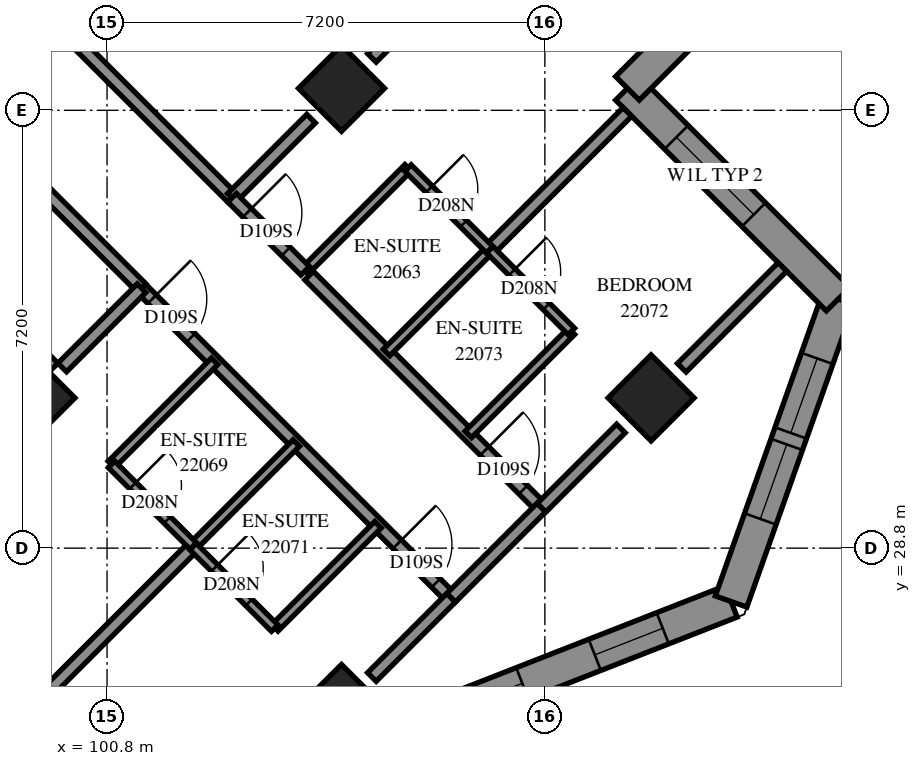
"""IFC4 building model, lengths in metres.
Left out: names, types, materials, properties, quantities, classifications, styles, units other than length and angle.
Written with IfcOpenShell. Run it as: python <this file> out.ifc"""

import sys

from ifc_helpers import new_model, si_unit, direction, frame, frame_2d, origin, origin_2d, place, context, subcontext, project, spatial, polyline, rectangle, outline, extrude, element, fill, save


model = new_model("IFC4")
c1 = context("Model", 3, precision=1e-05, world=origin(), true_north=direction((0.0, 1.0)))
c2 = subcontext(c1, "Body", "Model", "MODEL_VIEW")
j1 = project(units=[si_unit("LENGTHUNIT", "METRE"), si_unit("PLANEANGLEUNIT", "RADIAN")], contexts=[c1])
p1 = place(None, origin())
s1 = spatial("IfcSite", under=j1, at=p1, CompositionType="ELEMENT")
p2 = place(p1, origin())
s2 = spatial("IfcBuilding", under=s1, at=p2, CompositionType="ELEMENT")
p3 = place(p2, frame((0.0, 0.0, 84.6)))
s3 = spatial("IfcBuildingStorey", under=s2, at=p3, CompositionType="ELEMENT", Elevation=84.6)
for number, where, z_axis, x_axis in (
    (1, (104.656, 36.362, 0.0), (0.0, 0.0, 1.0), (0.707, -0.707, 0.0)),
    (2, (99.565, 31.271, 0.0), (0.0, 0.0, 1.0), (0.707, -0.707, 0.0)),
    (3, (109.747, 31.271, 0.0), (0.0, 0.0, 1.0), (0.707, -0.707, 0.0)),
    (4, (104.656, 26.18, 0.0), (0.0, 0.0, 1.0), (0.707, -0.707, 0.0)),
):
    element("IfcColumn", number, at=place(p3, frame(where, z_axis=z_axis, x_axis=x_axis)), inside=s3, PredefinedType="COLUMN", context=c2, shape_type="SweptSolid", body=[
        extrude(rectangle(XDim=1.0, YDim=1.0, at=origin_2d()), origin(), (0.0, 0.0, 1.0), 3.1),
    ])
p4 = place(p3, frame((105.953, 25.922, 0.0), z_axis=(0.0, 0.0, 1.0), x_axis=(0.9311384103, 0.3646659578, 0.0)))
e5 = element("IfcWall", 5, at=p4, inside=s3, PredefinedType="SOLIDWALL", context=c2, shape_type="SweptSolid", body=[
    extrude(outline(polyline([(0.12, -0.275), (5.613, -0.275), (5.361, 0.275), (-0.12, 0.275), (0.12, -0.275)])), origin(), (0.0, 0.0, 1.0), 3.1),
])
p5 = place(p4, frame((0.599, 0.0, 0.5)))
e6 = element("IfcOpeningElement", 6, at=p5, cuts=e5, PredefinedType="OPENING", context=c2, shape_type="SweptSolid", body=[
    extrude(rectangle(XDim=1.2, YDim=2.45, at=frame_2d((0.6, 1.225))), frame((0.0, 0.285, 0.0), z_axis=(0.0, -1.0, 0.0), x_axis=(1.0, 0.0, 0.0)), (0.0, 0.0, 1.0), 0.57),
])
p6 = place(p4, frame((3.08, 0.0, 0.5)))
e7 = element("IfcOpeningElement", 7, at=p6, cuts=e5, PredefinedType="OPENING", context=c2, shape_type="SweptSolid", body=[
    extrude(rectangle(XDim=1.2, YDim=2.45, at=frame_2d((0.6, 1.225))), frame((0.0, 0.285, 0.0), z_axis=(0.0, -1.0, 0.0), x_axis=(1.0, 0.0, 0.0)), (0.0, 0.0, 1.0), 0.57),
])
p7 = place(p3, frame((111.062, 27.922, 0.0), z_axis=(0.0, 0.0, 1.0), x_axis=(0.3338559134, 0.9426241187, 0.0)))
e8 = element("IfcWall", 8, at=p7, inside=s3, PredefinedType="SOLIDWALL", context=c2, shape_type="SweptSolid", body=[
    extrude(outline(polyline([(-0.126, -0.275), (5.45, -0.275), (5.103, 0.275), (0.126, 0.275), (-0.126, -0.275)])), origin(), (0.0, 0.0, 1.0), 3.1),
])
p8 = place(p7, frame((1.441, 0.0, 0.5)))
e9 = element("IfcOpeningElement", 9, at=p8, cuts=e8, PredefinedType="OPENING", context=c2, shape_type="SweptSolid", body=[
    extrude(rectangle(XDim=1.3, YDim=2.45, at=frame_2d((0.65, 1.225))), frame((0.0, 0.285, 0.0), z_axis=(0.0, -1.0, 0.0), x_axis=(1.0, 0.0, 0.0)), (0.0, 0.0, 1.0), 0.57),
])
p9 = place(p7, frame((2.941, 0.0, 0.5)))
e10 = element("IfcOpeningElement", 10, at=p9, cuts=e8, PredefinedType="OPENING", context=c2, shape_type="SweptSolid", body=[
    extrude(rectangle(XDim=1.3, YDim=2.45, at=frame_2d((0.65, 1.225))), frame((0.0, 0.285, 0.0), z_axis=(0.0, -1.0, 0.0), x_axis=(1.0, 0.0, 0.0)), (0.0, 0.0, 1.0), 0.57),
])
p10 = place(p3, frame((112.824, 32.896, 0.0), z_axis=(0.0, 0.0, 1.0), x_axis=(-0.7070965801, 0.7071169822, 0.0)))
e11 = element("IfcWall", 11, at=p10, inside=s3, PredefinedType="SOLIDWALL", context=c2, shape_type="SweptSolid", body=[
    extrude(outline(polyline([(-0.173, -0.275), (4.627, -0.275), (5.176, 0.275), (0.173, 0.275), (-0.173, -0.275)])), origin(), (0.0, 0.0, 1.0), 3.1),
])
p11 = place(p10, frame((1.964, 0.0, 0.6)))
e12 = element("IfcOpeningElement", 12, at=p11, cuts=e11, PredefinedType="OPENING", context=c2, shape_type="SweptSolid", body=[
    extrude(rectangle(XDim=1.8, YDim=1.9, at=frame_2d((0.9, 0.95))), frame((0.0, 0.285, 0.0), z_axis=(0.0, -1.0, 0.0), x_axis=(1.0, 0.0, 0.0)), (0.0, 0.0, 1.0), 0.57),
])
p12 = place(p3, frame((109.358, 36.362, 0.0), z_axis=(0.0, 0.0, 1.0), x_axis=(0.7071067812, 0.7071067812, 0.0)))
e13 = element("IfcWall", 13, at=p12, inside=s3, PredefinedType="SOLIDWALL", context=c2, shape_type="SweptSolid", body=[
    extrude(outline(polyline([(0.275, -0.275), (6.005, -0.275), (5.285, 0.275), (-0.275, 0.275), (0.275, -0.275)])), origin(), (0.0, 0.0, 1.0), 3.1),
])
p13 = place(p12, frame((1.137, 0.0, 0.6)))
e14 = element("IfcOpeningElement", 14, at=p13, cuts=e13, PredefinedType="OPENING", context=c2, shape_type="SweptSolid", body=[
    extrude(rectangle(XDim=1.8, YDim=1.9, at=frame_2d((0.9, 0.95))), frame((0.0, 0.285, 0.0), z_axis=(0.0, -1.0, 0.0), x_axis=(1.0, 0.0, 0.0)), (0.0, 0.0, 1.0), 0.57),
])
p14 = place(p3, frame((96.513, 23.123, 0.0), z_axis=(0.0, 0.0, 1.0), x_axis=(0.7069766463, 0.7072368922, 0.0)))
e15 = element("IfcWall", 15, at=p14, inside=s3, PredefinedType="PARTITIONING", context=c2, shape_type="SweptSolid", body=[
    extrude(rectangle(XDim=8.069, YDim=0.2, at=frame_2d((4.035, 0.0))), origin(), (0.0, 0.0, 1.0), 3.1),
])
p15 = place(p3, frame((101.365, 33.071, 0.0), z_axis=(0.0, 0.0, 1.0), x_axis=(0.7071067812, -0.7071067812, 0.0)))
e16 = element("IfcWall", 16, at=p15, inside=s3, PredefinedType="PARTITIONING", context=c2, shape_type="SweptSolid", body=[
    extrude(rectangle(XDim=7.2, YDim=0.2, at=frame_2d((3.6, 0.0))), origin(), (0.0, 0.0, 1.0), 3.1),
])
p16 = place(p15, frame((0.248, 0.0, 0.0)))
e17 = element("IfcOpeningElement", 17, at=p16, cuts=e16, PredefinedType="OPENING", context=c2, shape_type="SweptSolid", body=[
    extrude(rectangle(XDim=0.9, YDim=2.1, at=frame_2d((0.45, 1.05))), frame((0.0, 0.11, 0.0), z_axis=(0.0, -1.0, 0.0), x_axis=(1.0, 0.0, 0.0)), (0.0, 0.0, 1.0), 0.22),
])
p17 = place(p15, frame((5.95, 0.0, 0.0)))
e18 = element("IfcOpeningElement", 18, at=p17, cuts=e16, PredefinedType="OPENING", context=c2, shape_type="SweptSolid", body=[
    extrude(rectangle(XDim=0.9, YDim=2.1, at=frame_2d((0.45, 1.05))), frame((0.0, 0.11, 0.0), z_axis=(0.0, -1.0, 0.0), x_axis=(1.0, 0.0, 0.0)), (0.0, 0.0, 1.0), 0.22),
])
p18 = place(p3, frame((105.155, 36.863, 0.0), z_axis=(0.0, 0.0, 1.0), x_axis=(0.7071067812, 0.7071067812, 0.0)))
e19 = element("IfcWall", 19, at=p18, inside=s3, PredefinedType="PARTITIONING", context=c2, shape_type="SweptSolid", body=[
    extrude(rectangle(XDim=5.787, YDim=0.2, at=frame_2d((2.893, 0.0))), origin(), (0.0, 0.0, 1.0), 3.1),
])
p19 = place(p3, frame((104.123, 33.282, 0.0), z_axis=(0.0, 0.0, 1.0), x_axis=(0.7071067812, -0.7071067812, 0.0)))
e20 = element("IfcWall", 20, at=p19, inside=s3, PredefinedType="PARTITIONING", context=c2, shape_type="SweptSolid", body=[
    extrude(rectangle(XDim=5.399, YDim=0.2, at=frame_2d((2.7, 0.0))), origin(), (0.0, 0.0, 1.0), 3.1),
])
p20 = place(p19, frame((4.08, 0.0, 0.0)))
e21 = element("IfcOpeningElement", 21, at=p20, cuts=e20, PredefinedType="OPENING", context=c2, shape_type="SweptSolid", body=[
    extrude(rectangle(XDim=0.9, YDim=2.1, at=frame_2d((0.45, 1.05))), frame((0.0, 0.11, 0.0), z_axis=(0.0, -1.0, 0.0), x_axis=(1.0, 0.0, 0.0)), (0.0, 0.0, 1.0), 0.22),
])
p21 = place(p3, frame((98.469, 35.973, 0.0), z_axis=(0.0, 0.0, 1.0), x_axis=(0.7073506531, -0.7068628251, 0.0)))
e22 = element("IfcWall", 22, at=p21, inside=s3, PredefinedType="PARTITIONING", context=c2, shape_type="SweptSolid", body=[
    extrude(rectangle(XDim=4.1, YDim=0.2, at=frame_2d((2.05, 0.0))), origin(), (0.0, 0.0, 1.0), 3.1),
])
p22 = place(p21, frame((0.457, 0.0, 0.0)))
e23 = element("IfcOpeningElement", 23, at=p22, cuts=e22, PredefinedType="OPENING", context=c2, shape_type="SweptSolid", body=[
    extrude(rectangle(XDim=1.0, YDim=2.1, at=frame_2d((0.5, 1.05))), frame((0.0, 0.11, 0.0), z_axis=(0.0, -1.0, 0.0), x_axis=(1.0, 0.0, 0.0)), (0.0, 0.0, 1.0), 0.22),
])
p23 = place(p3, frame((100.31, 37.106, 0.0), z_axis=(0.0, 0.0, 1.0), x_axis=(0.7073845681, -0.7068288851, 0.0)))
e24 = element("IfcWall", 24, at=p23, inside=s3, PredefinedType="PARTITIONING", context=c2, shape_type="SweptSolid", body=[
    extrude(rectangle(XDim=3.599, YDim=0.2, at=frame_2d((1.8, 0.0))), origin(), (0.0, 0.0, 1.0), 3.1),
])
p24 = place(p3, frame((107.095, 33.711, 0.0), z_axis=(0.0, 0.0, 1.0), x_axis=(0.7071067812, 0.7071067812, 0.0)))
e25 = element("IfcWall", 25, at=p24, inside=s3, PredefinedType="PARTITIONING", context=c2, shape_type="SweptSolid", body=[
    extrude(rectangle(XDim=3.2, YDim=0.2, at=frame_2d((1.6, 0.0))), origin(), (0.0, 0.0, 1.0), 3.1),
])
p25 = place(p3, frame((100.871, 30.175, 0.0), z_axis=(0.0, 0.0, 1.0), x_axis=(0.7071067812, 0.7071067812, 0.0)))
e26 = element("IfcWall", 26, at=p25, inside=s3, PredefinedType="PARTITIONING", context=c2, shape_type="SweptSolid", body=[
    extrude(rectangle(XDim=2.401, YDim=0.15, at=frame_2d((1.201, 0.0))), origin(), (0.0, 0.0, 1.0), 3.1),
])
p26 = place(p3, frame((105.396, 32.016, 0.0), z_axis=(0.0, 0.0, 1.0), x_axis=(0.7075233388, 0.706689978, 0.0)))
e27 = element("IfcWall", 27, at=p26, inside=s3, PredefinedType="PARTITIONING", context=c2, shape_type="SweptSolid", body=[
    extrude(rectangle(XDim=2.4, YDim=0.15, at=frame_2d((1.2, 0.0))), origin(), (0.0, 0.0, 1.0), 3.1),
])
for number, where, z_axis, x_axis in (
    (28, (102.216, 28.832, 0.0), (0.0, 0.0, 1.0), (0.707, 0.707, 0.0)),
    (29, (104.055, 33.359, 0.0), (0.0, 0.0, 1.0), (0.707, 0.707, 0.0)),
    (30, (103.559, 27.489, 0.0), (0.0, 0.0, 1.0), (0.707, 0.707, 0.0)),
    (31, (106.741, 30.671, 0.0), (0.0, 0.0, 1.0), (0.707, 0.707, 0.0)),
):
    element("IfcWall", number, at=place(p3, frame(where, z_axis=z_axis, x_axis=x_axis)), inside=s3, PredefinedType="PARTITIONING", context=c2, shape_type="SweptSolid", body=[
        extrude(rectangle(XDim=2.398, YDim=0.15, at=frame_2d((1.199, 0.0))), origin(), (0.0, 0.0, 1.0), 3.1),
    ])
p27 = place(p3, frame((110.251, 31.767, 0.0), z_axis=(0.0, 0.0, 1.0), x_axis=(0.7066584143, 0.7075548639, 0.0)))
e32 = element("IfcWall", 32, at=p27, inside=s3, PredefinedType="PARTITIONING", context=c2, shape_type="SweptSolid", body=[
    extrude(rectangle(XDim=2.343, YDim=0.2, at=frame_2d((1.171, 0.0))), origin(), (0.0, 0.0, 1.0), 3.1),
])
p28 = place(p3, frame((106.457, 27.983, 0.0), z_axis=(0.0, 0.0, 1.0), x_axis=(0.7071067812, 0.7071067812, 0.0)))
e33 = element("IfcWall", 33, at=p28, inside=s3, PredefinedType="PARTITIONING", context=c2, shape_type="SweptSolid", body=[
    extrude(rectangle(XDim=2.102, YDim=0.2, at=frame_2d((1.051, 0.0))), origin(), (0.0, 0.0, 1.0), 2.6),
])
p29 = place(p3, frame((105.749, 35.051, 0.0), z_axis=(0.0, 0.0, 1.0), x_axis=(0.7071067812, -0.7071067812, 0.0)))
e34 = element("IfcWall", 34, at=p29, inside=s3, PredefinedType="PARTITIONING", context=c2, shape_type="SweptSolid", body=[
    extrude(rectangle(XDim=1.901, YDim=0.15, at=frame_2d((0.95, 0.0))), origin(), (0.0, 0.0, 1.0), 3.1),
])
p30 = place(p29, frame((0.493, 0.0, 0.0)))
e35 = element("IfcOpeningElement", 35, at=p30, cuts=e34, PredefinedType="OPENING", context=c2, shape_type="SweptSolid", body=[
    extrude(rectangle(XDim=0.8, YDim=2.1, at=frame_2d((0.4, 1.05))), frame((0.0, 0.085, 0.0), z_axis=(0.0, -1.0, 0.0), x_axis=(1.0, 0.0, 0.0)), (0.0, 0.0, 1.0), 0.17),
])
p31 = place(p3, frame((100.875, 30.177, 0.0), z_axis=(0.0, 0.0, 1.0), x_axis=(0.7076330979, -0.7065800724, 0.0)))
e36 = element("IfcWall", 36, at=p31, inside=s3, PredefinedType="PARTITIONING", context=c2, shape_type="SweptSolid", body=[
    extrude(rectangle(XDim=1.899, YDim=0.15, at=frame_2d((0.95, 0.0))), origin(), (0.0, 0.0, 1.0), 3.1),
])
p32 = place(p31, frame((0.493, 0.0, 0.0)))
e37 = element("IfcOpeningElement", 37, at=p32, cuts=e36, PredefinedType="OPENING", context=c2, shape_type="SweptSolid", body=[
    extrude(rectangle(XDim=0.8, YDim=2.1, at=frame_2d((0.4, 1.05))), frame((0.0, 0.085, 0.0), z_axis=(0.0, -1.0, 0.0), x_axis=(1.0, 0.0, 0.0)), (0.0, 0.0, 1.0), 0.17),
])
p33 = place(p3, frame((107.094, 33.708, 0.0), z_axis=(0.0, 0.0, 1.0), x_axis=(0.7065800724, -0.7076330979, 0.0)))
e38 = element("IfcWall", 38, at=p33, inside=s3, PredefinedType="PARTITIONING", context=c2, shape_type="SweptSolid", body=[
    extrude(rectangle(XDim=1.899, YDim=0.15, at=frame_2d((0.95, 0.0))), origin(), (0.0, 0.0, 1.0), 3.1),
])
p34 = place(p33, frame((0.519, 0.0, 0.0)))
e39 = element("IfcOpeningElement", 39, at=p34, cuts=e38, PredefinedType="OPENING", context=c2, shape_type="SweptSolid", body=[
    extrude(rectangle(XDim=0.8, YDim=2.1, at=frame_2d((0.4, 1.05))), frame((0.0, 0.085, 0.0), z_axis=(0.0, -1.0, 0.0), x_axis=(1.0, 0.0, 0.0)), (0.0, 0.0, 1.0), 0.17),
])
p35 = place(p3, frame((102.215, 28.826, 0.0), z_axis=(0.0, 0.0, 1.0), x_axis=(0.7071067812, -0.7071067812, 0.0)))
e40 = element("IfcWall", 40, at=p35, inside=s3, PredefinedType="PARTITIONING", context=c2, shape_type="SweptSolid", body=[
    extrude(rectangle(XDim=1.898, YDim=0.15, at=frame_2d((0.949, 0.0))), origin(), (0.0, 0.0, 1.0), 3.1),
])
p36 = place(p35, frame((0.5, 0.0, 0.0)))
e41 = element("IfcOpeningElement", 41, at=p36, cuts=e40, PredefinedType="OPENING", context=c2, shape_type="SweptSolid", body=[
    extrude(rectangle(XDim=0.8, YDim=2.1, at=frame_2d((0.4, 1.05))), frame((0.0, 0.085, 0.0), z_axis=(0.0, -1.0, 0.0), x_axis=(1.0, 0.0, 0.0)), (0.0, 0.0, 1.0), 0.17),
])
p37 = place(p3, frame((100.063, 31.771, 0.0), z_axis=(0.0, 0.0, 1.0), x_axis=(0.7071067812, 0.7071067812, 0.0)))
e42 = element("IfcWall", 42, at=p37, inside=s3, PredefinedType="PARTITIONING", context=c2, shape_type="SweptSolid", body=[
    extrude(rectangle(XDim=1.844, YDim=0.2, at=frame_2d((0.922, 0.0))), origin(), (0.0, 0.0, 1.0), 3.1),
])
p38 = place(p3, frame((107.947, 29.465, 0.0), z_axis=(0.0, 0.0, 1.0), x_axis=(0.7076492487, 0.7065638971, 0.0)))
e43 = element("IfcWall", 43, at=p38, inside=s3, PredefinedType="PARTITIONING", context=c2, shape_type="SweptSolid", body=[
    extrude(rectangle(XDim=1.843, YDim=0.2, at=frame_2d((0.921, 0.0))), origin(), (0.0, 0.0, 1.0), 2.6),
])
p39 = place(p3, frame((102.853, 34.561, 0.0), z_axis=(0.0, 0.0, 1.0), x_axis=(0.7071067812, 0.7071067812, 0.0)))
e44 = element("IfcWall", 44, at=p39, inside=s3, PredefinedType="PARTITIONING", context=c2, shape_type="SweptSolid", body=[
    extrude(rectangle(XDim=1.841, YDim=0.2, at=frame_2d((0.921, 0.0))), origin(), (0.0, 0.0, 1.0), 3.1),
])
p40 = place(p3, frame((105.155, 26.681, 0.0), z_axis=(0.0, 0.0, 1.0), x_axis=(0.7071067812, 0.7071067812, 0.0)))
e45 = element("IfcWall", 45, at=p40, inside=s3, PredefinedType="PARTITIONING", context=c2, shape_type="SweptSolid", body=[
    extrude(rectangle(XDim=1.841, YDim=0.2, at=frame_2d((0.921, 0.0))), origin(), (0.0, 0.0, 1.0), 2.6),
])
p41 = place(p3, frame((102.857, 34.563, 0.0), z_axis=(0.0, 0.0, 1.0), x_axis=(0.7071067812, -0.7071067812, 0.0)))
e46 = element("IfcWall", 46, at=p41, inside=s3, PredefinedType="PARTITIONING", context=c2, shape_type="SweptSolid", body=[
    extrude(rectangle(XDim=1.7, YDim=0.2, at=frame_2d((0.85, 0.0))), origin(), (0.0, 0.0, 1.0), 3.1),
])
p42 = place(p41, frame((0.35, 0.0, 0.0)))
e47 = element("IfcOpeningElement", 47, at=p42, cuts=e46, PredefinedType="OPENING", context=c2, shape_type="SweptSolid", body=[
    extrude(rectangle(XDim=0.9, YDim=2.1, at=frame_2d((0.45, 1.05))), frame((0.0, 0.11, 0.0), z_axis=(0.0, -1.0, 0.0), x_axis=(1.0, 0.0, 0.0)), (0.0, 0.0, 1.0), 0.22),
])
p43 = place(p3, frame((99.569, 32.123, 0.0), z_axis=(0.0, 0.0, 1.0), x_axis=(0.7071067812, -0.7071067812, 0.0)))
e48 = element("IfcWall", 48, at=p43, inside=s3, PredefinedType="PARTITIONING", context=c2, shape_type="SweptSolid", body=[
    extrude(rectangle(XDim=0.498, YDim=0.2, at=frame_2d((0.249, 0.0))), origin(), (0.0, 0.0, 1.0), 3.1),
])
p44 = place(p5, origin())
e49 = element("IfcWindow", 49, at=p44, inside=s3, PartitioningType="SINGLE_PANEL", PredefinedType="WINDOW", context=c2, shape_type="SweptSolid", body=[
    extrude(rectangle(XDim=1.2, YDim=2.45, at=frame_2d((0.6, 1.225))), frame((0.0, 0.155, 0.0), z_axis=(0.0, -1.0, 0.0), x_axis=(1.0, 0.0, 0.0)), (0.0, 0.0, 1.0), 0.06),
])
fill(e6, e49)
p45 = place(p6, origin())
e50 = element("IfcWindow", 50, at=p45, inside=s3, PartitioningType="SINGLE_PANEL", PredefinedType="WINDOW", context=c2, shape_type="SweptSolid", body=[
    extrude(rectangle(XDim=1.2, YDim=2.45, at=frame_2d((0.6, 1.225))), frame((0.0, 0.155, 0.0), z_axis=(0.0, -1.0, 0.0), x_axis=(1.0, 0.0, 0.0)), (0.0, 0.0, 1.0), 0.06),
])
fill(e7, e50)
p46 = place(p8, origin())
e51 = element("IfcWindow", 51, at=p46, inside=s3, PartitioningType="SINGLE_PANEL", PredefinedType="WINDOW", context=c2, shape_type="SweptSolid", body=[
    extrude(rectangle(XDim=1.3, YDim=2.45, at=frame_2d((0.65, 1.225))), frame((0.0, 0.155, 0.0), z_axis=(0.0, -1.0, 0.0), x_axis=(1.0, 0.0, 0.0)), (0.0, 0.0, 1.0), 0.06),
])
fill(e9, e51)
p47 = place(p9, origin())
e52 = element("IfcWindow", 52, at=p47, inside=s3, PartitioningType="SINGLE_PANEL", PredefinedType="WINDOW", context=c2, shape_type="SweptSolid", body=[
    extrude(rectangle(XDim=1.3, YDim=2.45, at=frame_2d((0.65, 1.225))), frame((0.0, 0.155, 0.0), z_axis=(0.0, -1.0, 0.0), x_axis=(1.0, 0.0, 0.0)), (0.0, 0.0, 1.0), 0.06),
])
fill(e10, e52)
p48 = place(p11, origin())
e53 = element("IfcWindow", 53, at=p48, inside=s3, PartitioningType="SINGLE_PANEL", PredefinedType="WINDOW", context=c2, shape_type="SweptSolid", body=[
    extrude(rectangle(XDim=1.8, YDim=1.9, at=frame_2d((0.9, 0.95))), frame((0.0, 0.155, 0.0), z_axis=(0.0, -1.0, 0.0), x_axis=(1.0, 0.0, 0.0)), (0.0, 0.0, 1.0), 0.06),
])
fill(e12, e53)
p49 = place(p42, origin())
e54 = element("IfcDoor", 54, at=p49, inside=s3, OperationType="SINGLE_SWING_LEFT", PredefinedType="DOOR", context=c2, shape_type="SweptSolid", body=[
    extrude(rectangle(XDim=0.9, YDim=2.1, at=frame_2d((0.45, 1.05))), frame((0.0, 0.025, 0.0), z_axis=(0.0, -1.0, 0.0), x_axis=(1.0, 0.0, 0.0)), (0.0, 0.0, 1.0), 0.05),
])
fill(e47, e54)
p50 = place(p30, origin())
e55 = element("IfcDoor", 55, at=p50, inside=s3, OperationType="SINGLE_SWING_RIGHT", PredefinedType="DOOR", context=c2, shape_type="SweptSolid", body=[
    extrude(rectangle(XDim=0.8, YDim=2.1, at=frame_2d((0.4, 1.05))), frame((0.0, 0.025, 0.0), z_axis=(0.0, -1.0, 0.0), x_axis=(1.0, 0.0, 0.0)), (0.0, 0.0, 1.0), 0.05),
])
fill(e35, e55)
p51 = place(p16, origin())
e56 = element("IfcDoor", 56, at=p51, inside=s3, OperationType="SINGLE_SWING_RIGHT", PredefinedType="DOOR", context=c2, shape_type="SweptSolid", body=[
    extrude(rectangle(XDim=0.9, YDim=2.1, at=frame_2d((0.45, 1.05))), frame((0.0, 0.025, 0.0), z_axis=(0.0, -1.0, 0.0), x_axis=(1.0, 0.0, 0.0)), (0.0, 0.0, 1.0), 0.05),
])
fill(e17, e56)
p52 = place(p32, origin())
e57 = element("IfcDoor", 57, at=p52, inside=s3, OperationType="SINGLE_SWING_RIGHT", PredefinedType="DOOR", context=c2, shape_type="SweptSolid", body=[
    extrude(rectangle(XDim=0.8, YDim=2.1, at=frame_2d((0.4, 1.05))), frame((0.0, 0.025, 0.0), z_axis=(0.0, -1.0, 0.0), x_axis=(1.0, 0.0, 0.0)), (0.0, 0.0, 1.0), 0.05),
])
fill(e37, e57)
p53 = place(p17, origin())
e58 = element("IfcDoor", 58, at=p53, inside=s3, OperationType="SINGLE_SWING_LEFT", PredefinedType="DOOR", context=c2, shape_type="SweptSolid", body=[
    extrude(rectangle(XDim=0.9, YDim=2.1, at=frame_2d((0.45, 1.05))), frame((0.0, 0.025, 0.0), z_axis=(0.0, -1.0, 0.0), x_axis=(1.0, 0.0, 0.0)), (0.0, 0.0, 1.0), 0.05),
])
fill(e18, e58)
p54 = place(p36, origin())
e59 = element("IfcDoor", 59, at=p54, inside=s3, OperationType="SINGLE_SWING_RIGHT", PredefinedType="DOOR", context=c2, shape_type="SweptSolid", body=[
    extrude(rectangle(XDim=0.8, YDim=2.1, at=frame_2d((0.4, 1.05))), frame((0.0, 0.025, 0.0), z_axis=(0.0, -1.0, 0.0), x_axis=(1.0, 0.0, 0.0)), (0.0, 0.0, 1.0), 0.05),
])
fill(e41, e59)
p55 = place(p20, origin())
e60 = element("IfcDoor", 60, at=p55, inside=s3, OperationType="SINGLE_SWING_RIGHT", PredefinedType="DOOR", context=c2, shape_type="SweptSolid", body=[
    extrude(rectangle(XDim=0.9, YDim=2.1, at=frame_2d((0.45, 1.05))), frame((0.0, 0.025, 0.0), z_axis=(0.0, -1.0, 0.0), x_axis=(1.0, 0.0, 0.0)), (0.0, 0.0, 1.0), 0.05),
])
fill(e21, e60)
p56 = place(p34, origin())
e61 = element("IfcDoor", 61, at=p56, inside=s3, OperationType="SINGLE_SWING_RIGHT", PredefinedType="DOOR", context=c2, shape_type="SweptSolid", body=[
    extrude(rectangle(XDim=0.8, YDim=2.1, at=frame_2d((0.4, 1.05))), frame((0.0, 0.025, 0.0), z_axis=(0.0, -1.0, 0.0), x_axis=(1.0, 0.0, 0.0)), (0.0, 0.0, 1.0), 0.05),
])
fill(e39, e61)
save(model, sys.argv[1])
